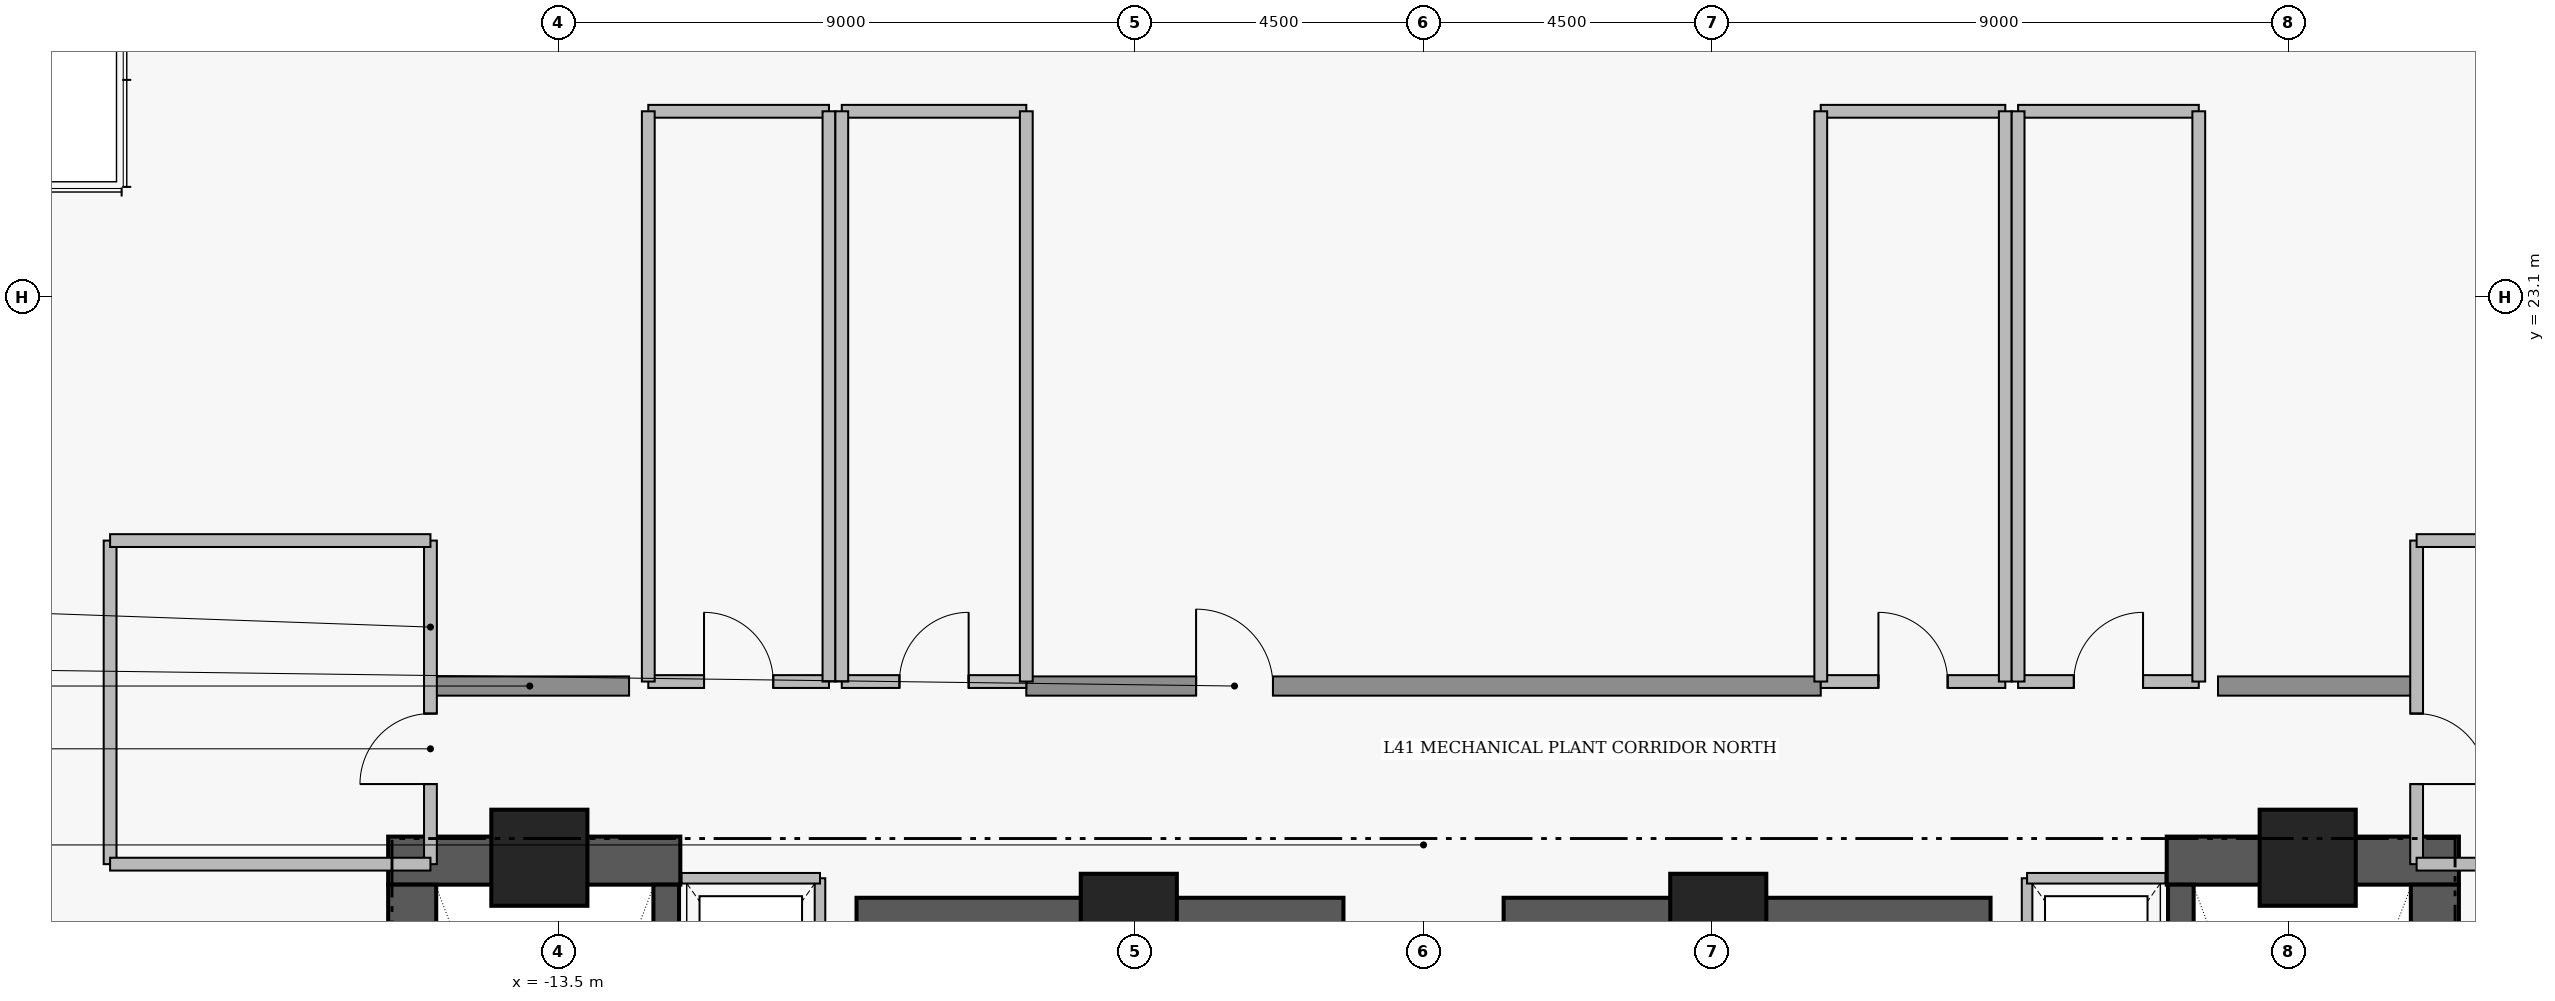
"""IFC4 building model, lengths in metres.
Left out: names, types, materials, properties, quantities, classifications, styles, units other than length and angle.
Written with IfcOpenShell. Run it as: python <this file> out.ifc"""

import sys

from ifc_helpers import new_model, si_unit, direction, frame, frame_2d, origin, origin_2d, place, context, subcontext, project, spatial, rectangle, extrude, element, fill, save


model = new_model("IFC4")
c1 = context("Model", 3, precision=1e-05, world=origin(), true_north=direction((0.0, 1.0)))
c2 = subcontext(c1, "Body", "Model", "MODEL_VIEW")
j1 = project(units=[si_unit("LENGTHUNIT", "METRE"), si_unit("PLANEANGLEUNIT", "RADIAN")], contexts=[c1])
p1 = place(None, origin())
s1 = spatial("IfcSite", under=j1, at=p1, CompositionType="ELEMENT")
p2 = place(p1, origin())
s2 = spatial("IfcBuilding", under=s1, at=p2, CompositionType="ELEMENT")
p3 = place(p2, frame((0.0, 0.0, 162.2)))
s3 = spatial("IfcBuildingStorey", under=s2, at=p3, CompositionType="ELEMENT", Elevation=162.2)
for number, where, z_axis, x_axis in (
    (1, (-16.16, 14.305, 0.0), (0.0, 0.0, 1.0), (1.0, 0.0, 0.0)),
    (2, (11.6, 14.305, 0.0), (0.0, 0.0, 1.0), (1.0, 0.0, 0.0)),
):
    element("IfcWall", number, at=place(p3, frame(where, z_axis=z_axis, x_axis=x_axis)), inside=s3, PredefinedType="SHEAR", context=c2, shape_type="SweptSolid", body=[
        extrude(rectangle(XDim=4.56, YDim=0.75, at=frame_2d((2.28, 0.0))), origin(), (0.0, 0.0, 1.0), 5.81),
    ])
for number, where, z_axis, x_axis in (
    (3, (-15.785, 4.97, 0.0), (0.0, 0.0, 1.0), (0.0, 1.0, 0.0)),
    (4, (15.785, 4.97, 0.0), (0.0, 0.0, 1.0), (0.0, 1.0, 0.0)),
):
    element("IfcWall", number, at=place(p3, frame(where, z_axis=z_axis, x_axis=x_axis)), inside=s3, PredefinedType="SHEAR", context=c2, shape_type="SweptSolid", body=[
        extrude(rectangle(XDim=8.96, YDim=0.75, at=frame_2d((4.48, 0.0))), origin(), (0.0, 0.0, 1.0), 5.81),
    ])
for number, where, z_axis, x_axis in (
    (5, (-8.85, 13.35, 0.0), (0.0, 0.0, 1.0), (1.0, 0.0, 0.0)),
    (6, (1.25, 13.35, 0.0), (0.0, 0.0, 1.0), (1.0, 0.0, 0.0)),
):
    element("IfcWall", number, at=place(p3, frame(where, z_axis=z_axis, x_axis=x_axis)), inside=s3, PredefinedType="SHEAR", context=c2, shape_type="SweptSolid", body=[
        extrude(rectangle(XDim=7.6, YDim=0.75, at=frame_2d((3.8, 0.0))), origin(), (0.0, 0.0, 1.0), 5.74),
    ])
p4 = place(p3, frame((-11.82, 4.97, 0.0), z_axis=(0.0, 0.0, 1.0), x_axis=(0.0, 1.0, 0.0)))
e7 = element("IfcWall", 7, at=p4, inside=s3, PredefinedType="SHEAR", context=c2, shape_type="SweptSolid", body=[
    extrude(rectangle(XDim=8.96, YDim=0.4, at=frame_2d((4.48, 0.0))), origin(), (0.0, 0.0, 1.0), 5.81),
])
p5 = place(p4, frame((0.31, 0.0, 0.0)))
e8 = element("IfcOpeningElement", 8, at=p5, cuts=e7, PredefinedType="OPENING", context=c2, shape_type="SweptSolid", body=[
    extrude(rectangle(XDim=1.12, YDim=2.22, at=frame_2d((0.56, 1.11))), frame((0.0, 0.21, 0.0), z_axis=(0.0, -1.0, 0.0), x_axis=(1.0, 0.0, 0.0)), (0.0, 0.0, 1.0), 0.42),
])
p6 = place(p3, frame((11.82, 13.93, 0.0), z_axis=(0.0, 0.0, 1.0), x_axis=(0.0, -1.0, 0.0)))
e9 = element("IfcWall", 9, at=p6, inside=s3, PredefinedType="SHEAR", context=c2, shape_type="SweptSolid", body=[
    extrude(rectangle(XDim=8.96, YDim=0.4, at=frame_2d((4.48, 0.0))), origin(), (0.0, 0.0, 1.0), 5.81),
])
p7 = place(p6, frame((7.53, 0.0, 0.0)))
e10 = element("IfcOpeningElement", 10, at=p7, cuts=e9, PredefinedType="OPENING", context=c2, shape_type="SweptSolid", body=[
    extrude(rectangle(XDim=1.12, YDim=2.22, at=frame_2d((0.56, 1.11))), frame((0.0, 0.21, 0.0), z_axis=(0.0, -1.0, 0.0), x_axis=(1.0, 0.0, 0.0)), (0.0, 0.0, 1.0), 0.42),
])
for number, where, z_axis, x_axis in (
    (11, (-13.8, 14.35, 0.0), (0.0, 0.0, 1.0), (1.0, 0.0, 0.0)),
    (12, (-4.6, 13.35, 0.0), (0.0, 0.0, 1.0), (1.0, 0.0, 0.0)),
    (13, (4.6, 13.35, 0.0), (0.0, 0.0, 1.0), (1.0, 0.0, 0.0)),
    (14, (13.8, 14.35, 0.0), (0.0, 0.0, 1.0), (1.0, 0.0, 0.0)),
):
    element("IfcColumn", number, at=place(p3, frame(where, z_axis=z_axis, x_axis=x_axis)), inside=s3, PredefinedType="COLUMN", context=c2, shape_type="SweptSolid", body=[
        extrude(rectangle(XDim=1.5, YDim=1.5, at=origin_2d()), origin(), (0.0, 0.0, 1.0), 6.0),
    ])
p8 = place(p3, frame((-23.25, 10.1, 0.43), z_axis=(0.212268755882, 0.766505270122, 0.606144905242), x_axis=(-0.963728159847, 0.266885806887, 0.0)))
e15 = element("IfcColumn", 15, at=p8, inside=s3, PredefinedType="COLUMN", context=c2, shape_type="SweptSolid", body=[
    extrude(rectangle(XDim=1.35, YDim=1.35, at=origin_2d()), origin(), (0.0, 0.0, 1.0), 8.48),
])
for number, where, z_axis, x_axis in (
    (16, (-15.5, 17.03, 0.0), (0.0, 0.0, 1.0), (1.0, 0.0, 0.0)),
    (17, (12.4, 17.03, 0.0), (0.0, 0.0, 1.0), (1.0, 0.0, 0.0)),
):
    element("IfcWall", number, at=place(p3, frame(where, z_axis=z_axis, x_axis=x_axis)), inside=s3, PredefinedType="STANDARD", context=c2, shape_type="SweptSolid", body=[
        extrude(rectangle(XDim=3.1, YDim=0.3, at=frame_2d((1.55, 0.0))), origin(), (0.0, 0.0, 1.0), 5.74),
    ])
p9 = place(p3, frame((-6.2, 17.03, 0.0), z_axis=(0.0, 0.0, 1.0), x_axis=(1.0, 0.0, 0.0)))
e18 = element("IfcWall", 18, at=p9, inside=s3, PredefinedType="STANDARD", context=c2, shape_type="SweptSolid", body=[
    extrude(rectangle(XDim=12.4, YDim=0.3, at=frame_2d((6.2, 0.0))), origin(), (0.0, 0.0, 1.0), 5.74),
])
p10 = place(p9, frame((2.65, 0.0, 0.0)))
e19 = element("IfcOpeningElement", 19, at=p10, cuts=e18, PredefinedType="OPENING", context=c2, shape_type="SweptSolid", body=[
    extrude(rectangle(XDim=1.2, YDim=2.2, at=frame_2d((0.6, 1.1))), frame((0.0, 0.16, 0.0), z_axis=(0.0, -1.0, 0.0), x_axis=(1.0, 0.0, 0.0)), (0.0, 0.0, 1.0), 0.32),
])
p11 = place(p3, frame((-15.5, 14.25, 0.0), z_axis=(0.0, 0.0, 1.0), x_axis=(0.0, 1.0, 0.0)))
e20 = element("IfcWall", 20, at=p11, inside=s3, PredefinedType="PARTITIONING", context=c2, shape_type="SweptSolid", body=[
    extrude(rectangle(XDim=5.05, YDim=0.2, at=frame_2d((2.525, 0.0))), origin(), (0.0, 0.0, 1.0), 5.74),
])
p12 = place(p11, frame((1.25, 0.0, 0.0)))
e21 = element("IfcOpeningElement", 21, at=p12, cuts=e20, PredefinedType="OPENING", context=c2, shape_type="SweptSolid", body=[
    extrude(rectangle(XDim=1.1, YDim=2.2, at=frame_2d((0.55, 1.1))), frame((0.0, 0.11, 0.0), z_axis=(0.0, -1.0, 0.0), x_axis=(1.0, 0.0, 0.0)), (0.0, 0.0, 1.0), 0.22),
])
p13 = place(p3, frame((15.5, 19.3, 0.0), z_axis=(0.0, 0.0, 1.0), x_axis=(0.0, -1.0, 0.0)))
e22 = element("IfcWall", 22, at=p13, inside=s3, PredefinedType="PARTITIONING", context=c2, shape_type="SweptSolid", body=[
    extrude(rectangle(XDim=5.05, YDim=0.2, at=frame_2d((2.525, 0.0))), origin(), (0.0, 0.0, 1.0), 5.74),
])
p14 = place(p13, frame((2.7, 0.0, 0.0)))
e23 = element("IfcOpeningElement", 23, at=p14, cuts=e22, PredefinedType="OPENING", context=c2, shape_type="SweptSolid", body=[
    extrude(rectangle(XDim=1.1, YDim=2.2, at=frame_2d((0.55, 1.1))), frame((0.0, 0.11, 0.0), z_axis=(0.0, -1.0, 0.0), x_axis=(1.0, 0.0, 0.0)), (0.0, 0.0, 1.0), 0.22),
])
p15 = place(p3, frame((-12.1, 17.1, 0.0), z_axis=(0.0, 0.0, 1.0), x_axis=(1.0, 0.0, 0.0)))
e24 = element("IfcWall", 24, at=p15, inside=s3, PredefinedType="PARTITIONING", context=c2, shape_type="SweptSolid", body=[
    extrude(rectangle(XDim=2.82, YDim=0.2, at=frame_2d((1.41, 0.0))), origin(), (0.0, 0.0, 1.0), 5.74),
])
p16 = place(p15, frame((0.87, 0.0, 0.0)))
e25 = element("IfcOpeningElement", 25, at=p16, cuts=e24, PredefinedType="OPENING", context=c2, shape_type="SweptSolid", body=[
    extrude(rectangle(XDim=1.08, YDim=2.18, at=frame_2d((0.54, 1.09))), frame((0.0, 0.11, 0.0), z_axis=(0.0, -1.0, 0.0), x_axis=(1.0, 0.0, 0.0)), (0.0, 0.0, 1.0), 0.22),
])
p17 = place(p3, frame((-9.08, 17.1, 0.0), z_axis=(0.0, 0.0, 1.0), x_axis=(1.0, 0.0, 0.0)))
e26 = element("IfcWall", 26, at=p17, inside=s3, PredefinedType="PARTITIONING", context=c2, shape_type="SweptSolid", body=[
    extrude(rectangle(XDim=2.88, YDim=0.2, at=frame_2d((1.44, 0.0))), origin(), (0.0, 0.0, 1.0), 5.74),
])
p18 = place(p17, frame((0.9, 0.0, 0.0)))
e27 = element("IfcOpeningElement", 27, at=p18, cuts=e26, PredefinedType="OPENING", context=c2, shape_type="SweptSolid", body=[
    extrude(rectangle(XDim=1.08, YDim=2.18, at=frame_2d((0.54, 1.09))), frame((0.0, 0.11, 0.0), z_axis=(0.0, -1.0, 0.0), x_axis=(1.0, 0.0, 0.0)), (0.0, 0.0, 1.0), 0.22),
])
p19 = place(p3, frame((6.2, 17.1, 0.0), z_axis=(0.0, 0.0, 1.0), x_axis=(1.0, 0.0, 0.0)))
e28 = element("IfcWall", 28, at=p19, inside=s3, PredefinedType="PARTITIONING", context=c2, shape_type="SweptSolid", body=[
    extrude(rectangle(XDim=2.88, YDim=0.2, at=frame_2d((1.44, 0.0))), origin(), (0.0, 0.0, 1.0), 5.74),
])
p20 = place(p19, frame((0.9, 0.0, 0.0)))
e29 = element("IfcOpeningElement", 29, at=p20, cuts=e28, PredefinedType="OPENING", context=c2, shape_type="SweptSolid", body=[
    extrude(rectangle(XDim=1.08, YDim=2.18, at=frame_2d((0.54, 1.09))), frame((0.0, 0.11, 0.0), z_axis=(0.0, -1.0, 0.0), x_axis=(1.0, 0.0, 0.0)), (0.0, 0.0, 1.0), 0.22),
])
p21 = place(p3, frame((9.28, 17.1, 0.0), z_axis=(0.0, 0.0, 1.0), x_axis=(1.0, 0.0, 0.0)))
e30 = element("IfcWall", 30, at=p21, inside=s3, PredefinedType="PARTITIONING", context=c2, shape_type="SweptSolid", body=[
    extrude(rectangle(XDim=2.82, YDim=0.2, at=frame_2d((1.41, 0.0))), origin(), (0.0, 0.0, 1.0), 5.74),
])
p22 = place(p21, frame((0.87, 0.0, 0.0)))
e31 = element("IfcOpeningElement", 31, at=p22, cuts=e30, PredefinedType="OPENING", context=c2, shape_type="SweptSolid", body=[
    extrude(rectangle(XDim=1.08, YDim=2.18, at=frame_2d((0.54, 1.09))), frame((0.0, 0.11, 0.0), z_axis=(0.0, -1.0, 0.0), x_axis=(1.0, 0.0, 0.0)), (0.0, 0.0, 1.0), 0.22),
])
p23 = place(p3, frame((-9.42, 11.07, 0.0), z_axis=(0.0, 0.0, 1.0), x_axis=(0.0, 1.0, 0.0)))
e32 = element("IfcWall", 32, at=p23, inside=s3, PredefinedType="PARTITIONING", context=c2, shape_type="SweptSolid", body=[
    extrude(rectangle(XDim=2.96, YDim=0.165, at=frame_2d((1.48, 0.0))), origin(), (0.0, 0.0, 1.0), 5.74),
])
p24 = place(p3, frame((-11.58, 14.03, 0.0), z_axis=(0.0, 0.0, 1.0), x_axis=(1.0, 0.0, 0.0)))
e33 = element("IfcWall", 33, at=p24, inside=s3, PredefinedType="PARTITIONING", context=c2, shape_type="SweptSolid", body=[
    extrude(rectangle(XDim=2.16, YDim=0.165, at=frame_2d((1.08, 0.0))), origin(), (0.0, 0.0, 1.0), 5.74),
])
p25 = place(p3, frame((9.42, 11.07, 0.0), z_axis=(0.0, 0.0, 1.0), x_axis=(0.0, 1.0, 0.0)))
e34 = element("IfcWall", 34, at=p25, inside=s3, PredefinedType="PARTITIONING", context=c2, shape_type="SweptSolid", body=[
    extrude(rectangle(XDim=2.96, YDim=0.165, at=frame_2d((1.48, 0.0))), origin(), (0.0, 0.0, 1.0), 5.74),
])
p26 = place(p3, frame((9.42, 14.03, 0.0), z_axis=(0.0, 0.0, 1.0), x_axis=(1.0, 0.0, 0.0)))
e35 = element("IfcWall", 35, at=p26, inside=s3, PredefinedType="PARTITIONING", context=c2, shape_type="SweptSolid", body=[
    extrude(rectangle(XDim=2.16, YDim=0.165, at=frame_2d((1.08, 0.0))), origin(), (0.0, 0.0, 1.0), 5.74),
])
p27 = place(p3, frame((-20.5, 14.25, 0.0), z_axis=(0.0, 0.0, 1.0), x_axis=(0.0, 1.0, 0.0)))
e36 = element("IfcWall", 36, at=p27, inside=s3, PredefinedType="PARTITIONING", context=c2, shape_type="SweptSolid", body=[
    extrude(rectangle(XDim=5.05, YDim=0.2, at=frame_2d((2.525, 0.0))), origin(), (0.0, 0.0, 1.0), 5.74),
])
for number, where, z_axis, x_axis in (
    (37, (-20.5, 19.3, 0.0), (0.0, 0.0, 1.0), (1.0, 0.0, 0.0)),
    (38, (-20.5, 14.25, 0.0), (0.0, 0.0, 1.0), (1.0, 0.0, 0.0)),
    (39, (15.5, 19.3, 0.0), (0.0, 0.0, 1.0), (1.0, 0.0, 0.0)),
    (40, (15.5, 14.25, 0.0), (0.0, 0.0, 1.0), (1.0, 0.0, 0.0)),
):
    element("IfcWall", number, at=place(p3, frame(where, z_axis=z_axis, x_axis=x_axis)), inside=s3, PredefinedType="PARTITIONING", context=c2, shape_type="SweptSolid", body=[
        extrude(rectangle(XDim=5.0, YDim=0.2, at=frame_2d((2.5, 0.0))), origin(), (0.0, 0.0, 1.0), 5.74),
    ])
p28 = place(p3, frame((-12.1, 26.0, 0.0), z_axis=(0.0, 0.0, 1.0), x_axis=(1.0, 0.0, 0.0)))
e41 = element("IfcWall", 41, at=p28, inside=s3, PredefinedType="PARTITIONING", context=c2, shape_type="SweptSolid", body=[
    extrude(rectangle(XDim=2.82, YDim=0.2, at=frame_2d((1.41, 0.0))), origin(), (0.0, 0.0, 1.0), 5.74),
])
for number, where, z_axis, x_axis in (
    (42, (-12.1, 17.1, 0.0), (0.0, 0.0, 1.0), (0.0, 1.0, 0.0)),
    (43, (-9.28, 17.1, 0.0), (0.0, 0.0, 1.0), (0.0, 1.0, 0.0)),
):
    element("IfcWall", number, at=place(p3, frame(where, z_axis=z_axis, x_axis=x_axis)), inside=s3, PredefinedType="PARTITIONING", context=c2, shape_type="SweptSolid", body=[
        extrude(rectangle(XDim=8.9, YDim=0.2, at=frame_2d((4.45, 0.0))), origin(), (0.0, 0.0, 1.0), 5.74),
    ])
p29 = place(p3, frame((-9.08, 26.0, 0.0), z_axis=(0.0, 0.0, 1.0), x_axis=(1.0, 0.0, 0.0)))
e44 = element("IfcWall", 44, at=p29, inside=s3, PredefinedType="PARTITIONING", context=c2, shape_type="SweptSolid", body=[
    extrude(rectangle(XDim=2.88, YDim=0.2, at=frame_2d((1.44, 0.0))), origin(), (0.0, 0.0, 1.0), 5.74),
])
for number, where, z_axis, x_axis in (
    (45, (-9.08, 17.1, 0.0), (0.0, 0.0, 1.0), (0.0, 1.0, 0.0)),
    (46, (-6.2, 17.1, 0.0), (0.0, 0.0, 1.0), (0.0, 1.0, 0.0)),
):
    element("IfcWall", number, at=place(p3, frame(where, z_axis=z_axis, x_axis=x_axis)), inside=s3, PredefinedType="PARTITIONING", context=c2, shape_type="SweptSolid", body=[
        extrude(rectangle(XDim=8.9, YDim=0.2, at=frame_2d((4.45, 0.0))), origin(), (0.0, 0.0, 1.0), 5.74),
    ])
p30 = place(p3, frame((6.2, 26.0, 0.0), z_axis=(0.0, 0.0, 1.0), x_axis=(1.0, 0.0, 0.0)))
e47 = element("IfcWall", 47, at=p30, inside=s3, PredefinedType="PARTITIONING", context=c2, shape_type="SweptSolid", body=[
    extrude(rectangle(XDim=2.88, YDim=0.2, at=frame_2d((1.44, 0.0))), origin(), (0.0, 0.0, 1.0), 5.74),
])
for number, where, z_axis, x_axis in (
    (48, (6.2, 17.1, 0.0), (0.0, 0.0, 1.0), (0.0, 1.0, 0.0)),
    (49, (9.08, 17.1, 0.0), (0.0, 0.0, 1.0), (0.0, 1.0, 0.0)),
):
    element("IfcWall", number, at=place(p3, frame(where, z_axis=z_axis, x_axis=x_axis)), inside=s3, PredefinedType="PARTITIONING", context=c2, shape_type="SweptSolid", body=[
        extrude(rectangle(XDim=8.9, YDim=0.2, at=frame_2d((4.45, 0.0))), origin(), (0.0, 0.0, 1.0), 5.74),
    ])
p31 = place(p3, frame((9.28, 26.0, 0.0), z_axis=(0.0, 0.0, 1.0), x_axis=(1.0, 0.0, 0.0)))
e50 = element("IfcWall", 50, at=p31, inside=s3, PredefinedType="PARTITIONING", context=c2, shape_type="SweptSolid", body=[
    extrude(rectangle(XDim=2.82, YDim=0.2, at=frame_2d((1.41, 0.0))), origin(), (0.0, 0.0, 1.0), 5.74),
])
for number, where, z_axis, x_axis in (
    (51, (9.28, 17.1, 0.0), (0.0, 0.0, 1.0), (0.0, 1.0, 0.0)),
    (52, (12.1, 17.1, 0.0), (0.0, 0.0, 1.0), (0.0, 1.0, 0.0)),
):
    element("IfcWall", number, at=place(p3, frame(where, z_axis=z_axis, x_axis=x_axis)), inside=s3, PredefinedType="PARTITIONING", context=c2, shape_type="SweptSolid", body=[
        extrude(rectangle(XDim=8.9, YDim=0.2, at=frame_2d((4.45, 0.0))), origin(), (0.0, 0.0, 1.0), 5.74),
    ])
p32 = place(p10, origin())
e53 = element("IfcDoor", 53, at=p32, inside=s3, OperationType="SINGLE_SWING_LEFT", PredefinedType="DOOR", context=c2, shape_type="SweptSolid", body=[
    extrude(rectangle(XDim=1.2, YDim=2.2, at=frame_2d((0.6, 1.1))), frame((0.0, 0.025, 0.0), z_axis=(0.0, -1.0, 0.0), x_axis=(1.0, 0.0, 0.0)), (0.0, 0.0, 1.0), 0.05),
])
fill(e19, e53)
p33 = place(p12, origin())
e54 = element("IfcDoor", 54, at=p33, inside=s3, OperationType="SINGLE_SWING_LEFT", PredefinedType="DOOR", context=c2, shape_type="SweptSolid", body=[
    extrude(rectangle(XDim=1.1, YDim=2.2, at=frame_2d((0.55, 1.1))), frame((0.0, 0.025, 0.0), z_axis=(0.0, -1.0, 0.0), x_axis=(1.0, 0.0, 0.0)), (0.0, 0.0, 1.0), 0.05),
])
fill(e21, e54)
p34 = place(p14, origin())
e55 = element("IfcDoor", 55, at=p34, inside=s3, OperationType="SINGLE_SWING_RIGHT", PredefinedType="DOOR", context=c2, shape_type="SweptSolid", body=[
    extrude(rectangle(XDim=1.1, YDim=2.2, at=frame_2d((0.55, 1.1))), frame((0.0, 0.025, 0.0), z_axis=(0.0, -1.0, 0.0), x_axis=(1.0, 0.0, 0.0)), (0.0, 0.0, 1.0), 0.05),
])
fill(e23, e55)
p35 = place(p16, origin())
e56 = element("IfcDoor", 56, at=p35, inside=s3, OperationType="SINGLE_SWING_LEFT", PredefinedType="DOOR", context=c2, shape_type="SweptSolid", body=[
    extrude(rectangle(XDim=1.08, YDim=2.18, at=frame_2d((0.54, 1.09))), frame((0.0, 0.025, 0.0), z_axis=(0.0, -1.0, 0.0), x_axis=(1.0, 0.0, 0.0)), (0.0, 0.0, 1.0), 0.05),
])
fill(e25, e56)
p36 = place(p18, origin())
e57 = element("IfcDoor", 57, at=p36, inside=s3, OperationType="SINGLE_SWING_RIGHT", PredefinedType="DOOR", context=c2, shape_type="SweptSolid", body=[
    extrude(rectangle(XDim=1.08, YDim=2.18, at=frame_2d((0.54, 1.09))), frame((0.0, 0.025, 0.0), z_axis=(0.0, -1.0, 0.0), x_axis=(1.0, 0.0, 0.0)), (0.0, 0.0, 1.0), 0.05),
])
fill(e27, e57)
p37 = place(p20, origin())
e58 = element("IfcDoor", 58, at=p37, inside=s3, OperationType="SINGLE_SWING_LEFT", PredefinedType="DOOR", context=c2, shape_type="SweptSolid", body=[
    extrude(rectangle(XDim=1.08, YDim=2.18, at=frame_2d((0.54, 1.09))), frame((0.0, 0.025, 0.0), z_axis=(0.0, -1.0, 0.0), x_axis=(1.0, 0.0, 0.0)), (0.0, 0.0, 1.0), 0.05),
])
fill(e29, e58)
p38 = place(p22, origin())
e59 = element("IfcDoor", 59, at=p38, inside=s3, OperationType="SINGLE_SWING_RIGHT", PredefinedType="DOOR", context=c2, shape_type="SweptSolid", body=[
    extrude(rectangle(XDim=1.08, YDim=2.18, at=frame_2d((0.54, 1.09))), frame((0.0, 0.025, 0.0), z_axis=(0.0, -1.0, 0.0), x_axis=(1.0, 0.0, 0.0)), (0.0, 0.0, 1.0), 0.05),
])
fill(e31, e59)
save(model, sys.argv[1])
